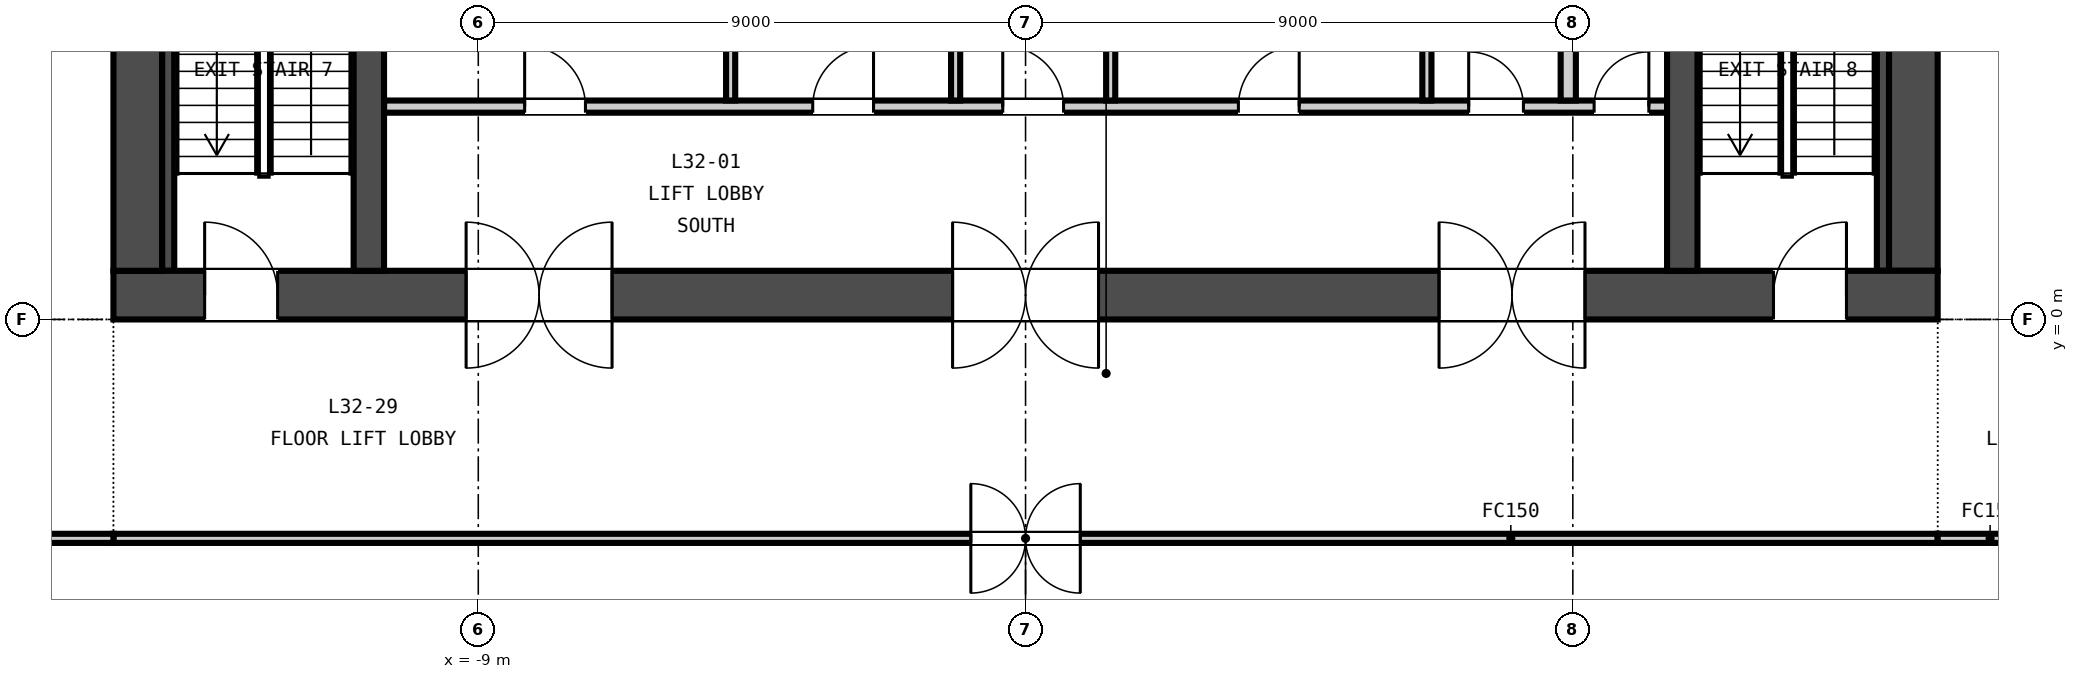
"""IFC4 building model, lengths in metres.
Left out: names, types, materials, properties, quantities, classifications, styles, units other than length and angle.
Written with IfcOpenShell. Run it as: python <this file> out.ifc"""

import sys

from ifc_helpers import new_model, si_unit, direction, frame, frame_2d, origin, place, context, subcontext, project, spatial, rectangle, extrude, element, fill, save


model = new_model("IFC4")
c1 = context("Model", 3, precision=1e-05, world=origin(), true_north=direction((0.0, 1.0)))
c2 = subcontext(c1, "Body", "Model", "MODEL_VIEW")
j1 = project(units=[si_unit("LENGTHUNIT", "METRE"), si_unit("PLANEANGLEUNIT", "RADIAN")], contexts=[c1])
p1 = place(None, origin())
s1 = spatial("IfcSite", under=j1, at=p1, CompositionType="ELEMENT")
p2 = place(p1, origin())
s2 = spatial("IfcBuilding", under=s1, at=p2, CompositionType="ELEMENT")
p3 = place(p2, frame((0.0, 0.0, 133.45)))
s3 = spatial("IfcBuildingStorey", under=s2, at=p3, CompositionType="ELEMENT", Elevation=133.45)
p4 = place(p3, frame((-15.0, 0.4, -0.15), z_axis=(0.0, 0.0, 1.0), x_axis=(1.0, 0.0, 0.0)))
e1 = element("IfcWall", 1, at=p4, inside=s3, PredefinedType="SOLIDWALL", context=c2, shape_type="SweptSolid", body=[
    extrude(rectangle(XDim=30.0, YDim=0.8, at=frame_2d((15.0, 0.0))), origin(), (0.0, 0.0, 1.0), 3.65),
])
p5 = place(p4, frame((5.8, 0.0, 0.15)))
e2 = element("IfcOpeningElement", 2, at=p5, cuts=e1, PredefinedType="OPENING", context=c2, shape_type="SweptSolid", body=[
    extrude(rectangle(XDim=2.4, YDim=2.4, at=frame_2d((1.2, 1.2))), frame((0.0, 0.41, 0.0), z_axis=(0.0, -1.0, 0.0), x_axis=(1.0, 0.0, 0.0)), (0.0, 0.0, 1.0), 0.82),
])
p6 = place(p4, frame((13.8, 0.0, 0.15)))
e3 = element("IfcOpeningElement", 3, at=p6, cuts=e1, PredefinedType="OPENING", context=c2, shape_type="SweptSolid", body=[
    extrude(rectangle(XDim=2.4, YDim=2.4, at=frame_2d((1.2, 1.2))), frame((0.0, 0.41, 0.0), z_axis=(0.0, -1.0, 0.0), x_axis=(1.0, 0.0, 0.0)), (0.0, 0.0, 1.0), 0.82),
])
p7 = place(p4, frame((21.8, 0.0, 0.15)))
e4 = element("IfcOpeningElement", 4, at=p7, cuts=e1, PredefinedType="OPENING", context=c2, shape_type="SweptSolid", body=[
    extrude(rectangle(XDim=2.4, YDim=2.4, at=frame_2d((1.2, 1.2))), frame((0.0, 0.41, 0.0), z_axis=(0.0, -1.0, 0.0), x_axis=(1.0, 0.0, 0.0)), (0.0, 0.0, 1.0), 0.82),
])
p8 = place(p4, frame((1.5, 0.0, 0.15)))
e5 = element("IfcOpeningElement", 5, at=p8, cuts=e1, PredefinedType="OPENING", context=c2, shape_type="SweptSolid", body=[
    extrude(rectangle(XDim=1.2, YDim=2.1, at=frame_2d((0.6, 1.05))), frame((0.0, 0.41, 0.0), z_axis=(0.0, -1.0, 0.0), x_axis=(1.0, 0.0, 0.0)), (0.0, 0.0, 1.0), 0.82),
])
p9 = place(p4, frame((27.3, 0.0, 0.15)))
e6 = element("IfcOpeningElement", 6, at=p9, cuts=e1, PredefinedType="OPENING", context=c2, shape_type="SweptSolid", body=[
    extrude(rectangle(XDim=1.2, YDim=2.1, at=frame_2d((0.6, 1.05))), frame((0.0, 0.41, 0.0), z_axis=(0.0, -1.0, 0.0), x_axis=(1.0, 0.0, 0.0)), (0.0, 0.0, 1.0), 0.82),
])
for number, where, z_axis, x_axis in (
    (7, (-14.6, 0.8, -0.15), (0.0, 0.0, 1.0), (0.0, 1.0, 0.0)),
    (8, (14.6, 0.8, -0.15), (0.0, 0.0, 1.0), (0.0, 1.0, 0.0)),
):
    element("IfcWall", number, at=place(p3, frame(where, z_axis=z_axis, x_axis=x_axis)), inside=s3, PredefinedType="SOLIDWALL", context=c2, shape_type="SweptSolid", body=[
        extrude(rectangle(XDim=13.4, YDim=0.8, at=frame_2d((6.7, 0.0))), origin(), (0.0, 0.0, 1.0), 3.65),
    ])
for number, where, z_axis, x_axis in (
    (9, (-10.8, 0.8, -0.15), (0.0, 0.0, 1.0), (0.0, 1.0, 0.0)),
    (10, (10.8, 0.8, -0.15), (0.0, 0.0, 1.0), (0.0, 1.0, 0.0)),
):
    element("IfcWall", number, at=place(p3, frame(where, z_axis=z_axis, x_axis=x_axis)), inside=s3, PredefinedType="SOLIDWALL", context=c2, shape_type="SweptSolid", body=[
        extrude(rectangle(XDim=13.4, YDim=0.5, at=frame_2d((6.7, 0.0))), origin(), (0.0, 0.0, 1.0), 3.65),
    ])
p10 = place(p3, frame((-10.55, 3.5, 0.0), z_axis=(0.0, 0.0, 1.0), x_axis=(1.0, 0.0, 0.0)))
e11 = element("IfcWall", 11, at=p10, inside=s3, PredefinedType="PARTITIONING", context=c2, shape_type="SweptSolid", body=[
    extrude(rectangle(XDim=21.1, YDim=0.2, at=frame_2d((10.55, 0.0))), origin(), (0.0, 0.0, 1.0), 3.5),
])
p11 = place(p10, frame((2.312, 0.0, 0.0)))
e12 = element("IfcOpeningElement", 12, at=p11, cuts=e11, PredefinedType="OPENING", context=c2, shape_type="SweptSolid", body=[
    extrude(rectangle(XDim=1.0, YDim=2.1, at=frame_2d((0.5, 1.05))), frame((0.0, 0.11, 0.0), z_axis=(0.0, -1.0, 0.0), x_axis=(1.0, 0.0, 0.0)), (0.0, 0.0, 1.0), 0.22),
])
p12 = place(p10, frame((7.05, 0.0, 0.0)))
e13 = element("IfcOpeningElement", 13, at=p12, cuts=e11, PredefinedType="OPENING", context=c2, shape_type="SweptSolid", body=[
    extrude(rectangle(XDim=1.0, YDim=2.1, at=frame_2d((0.5, 1.05))), frame((0.0, 0.11, 0.0), z_axis=(0.0, -1.0, 0.0), x_axis=(1.0, 0.0, 0.0)), (0.0, 0.0, 1.0), 0.22),
])
p13 = place(p10, frame((10.175, 0.0, 0.0)))
e14 = element("IfcOpeningElement", 14, at=p13, cuts=e11, PredefinedType="OPENING", context=c2, shape_type="SweptSolid", body=[
    extrude(rectangle(XDim=1.0, YDim=2.1, at=frame_2d((0.5, 1.05))), frame((0.0, 0.11, 0.0), z_axis=(0.0, -1.0, 0.0), x_axis=(1.0, 0.0, 0.0)), (0.0, 0.0, 1.0), 0.22),
])
p14 = place(p10, frame((14.05, 0.0, 0.0)))
e15 = element("IfcOpeningElement", 15, at=p14, cuts=e11, PredefinedType="OPENING", context=c2, shape_type="SweptSolid", body=[
    extrude(rectangle(XDim=1.0, YDim=2.1, at=frame_2d((0.5, 1.05))), frame((0.0, 0.11, 0.0), z_axis=(0.0, -1.0, 0.0), x_axis=(1.0, 0.0, 0.0)), (0.0, 0.0, 1.0), 0.22),
])
p15 = place(p10, frame((17.837, 0.0, 0.0)))
e16 = element("IfcOpeningElement", 16, at=p15, cuts=e11, PredefinedType="OPENING", context=c2, shape_type="SweptSolid", body=[
    extrude(rectangle(XDim=0.9, YDim=2.1, at=frame_2d((0.45, 1.05))), frame((0.0, 0.11, 0.0), z_axis=(0.0, -1.0, 0.0), x_axis=(1.0, 0.0, 0.0)), (0.0, 0.0, 1.0), 0.22),
])
p16 = place(p10, frame((19.9, 0.0, 0.0)))
e17 = element("IfcOpeningElement", 17, at=p16, cuts=e11, PredefinedType="OPENING", context=c2, shape_type="SweptSolid", body=[
    extrude(rectangle(XDim=0.9, YDim=2.1, at=frame_2d((0.45, 1.05))), frame((0.0, 0.11, 0.0), z_axis=(0.0, -1.0, 0.0), x_axis=(1.0, 0.0, 0.0)), (0.0, 0.0, 1.0), 0.22),
])
for number, where, z_axis, x_axis in (
    (18, (-4.85, 3.6, 0.0), (0.0, 0.0, 1.0), (0.0, 1.0, 0.0)),
    (19, (-1.15, 3.6, 0.0), (0.0, 0.0, 1.0), (0.0, 1.0, 0.0)),
    (20, (1.4, 3.6, 0.0), (0.0, 0.0, 1.0), (0.0, 1.0, 0.0)),
    (21, (6.6, 3.6, 0.0), (0.0, 0.0, 1.0), (0.0, 1.0, 0.0)),
):
    element("IfcWall", number, at=place(p3, frame(where, z_axis=z_axis, x_axis=x_axis)), inside=s3, PredefinedType="PARTITIONING", context=c2, shape_type="SweptSolid", body=[
        extrude(rectangle(XDim=2.3, YDim=0.15, at=frame_2d((1.15, 0.0))), origin(), (0.0, 0.0, 1.0), 3.5),
    ])
p17 = place(p3, frame((8.925, 3.6, 0.0), z_axis=(0.0, 0.0, 1.0), x_axis=(0.0, 1.0, 0.0)))
e22 = element("IfcWall", 22, at=p17, inside=s3, PredefinedType="PARTITIONING", context=c2, shape_type="SweptSolid", body=[
    extrude(rectangle(XDim=2.3, YDim=0.25, at=frame_2d((1.15, 0.0))), origin(), (0.0, 0.0, 1.0), 3.5),
])
for number, where, z_axis, x_axis in (
    (23, (-14.1, 0.8, 0.0), (0.0, 0.0, 1.0), (0.0, 1.0, 0.0)),
    (24, (14.1, 0.8, 0.0), (0.0, 0.0, 1.0), (0.0, 1.0, 0.0)),
):
    element("IfcWall", number, at=place(p3, frame(where, z_axis=z_axis, x_axis=x_axis)), inside=s3, PredefinedType="SOLIDWALL", context=c2, shape_type="SweptSolid", body=[
        extrude(rectangle(XDim=13.4, YDim=0.2, at=frame_2d((6.7, 0.0))), origin(), (0.0, 0.0, 1.0), 3.5),
    ])
p18 = place(p3, frame((15.0, -3.6, 0.0), z_axis=(0.0, 0.0, 1.0), x_axis=(-1.0, 0.0, 0.0)))
e25 = element("IfcWall", 25, at=p18, inside=s3, PredefinedType="PARTITIONING", context=c2, shape_type="SweptSolid", body=[
    extrude(rectangle(XDim=30.0, YDim=0.15, at=frame_2d((15.0, 0.0))), origin(), (0.0, 0.0, 1.0), 2.741),
])
p19 = place(p18, frame((14.1, 0.0, 0.0)))
e26 = element("IfcOpeningElement", 26, at=p19, cuts=e25, PredefinedType="OPENING", context=c2, shape_type="SweptSolid", body=[
    extrude(rectangle(XDim=1.8, YDim=2.1, at=frame_2d((0.9, 1.05))), frame((0.0, 0.085, 0.0), z_axis=(0.0, -1.0, 0.0), x_axis=(1.0, 0.0, 0.0)), (0.0, 0.0, 1.0), 0.17),
])
p20 = place(p3, frame((16.714, -3.6, 0.0), z_axis=(0.0, 0.0, 1.0), x_axis=(-1.0, 0.0, 0.0)))
e27 = element("IfcWall", 27, at=p20, inside=s3, PredefinedType="PARTITIONING", context=c2, shape_type="SweptSolid", body=[
    extrude(rectangle(XDim=1.714, YDim=0.15, at=frame_2d((0.857, 0.0))), origin(), (0.0, 0.0, 1.0), 2.741),
])
p21 = place(p3, frame((-15.0, -3.6, 0.0), z_axis=(0.0, 0.0, 1.0), x_axis=(-1.0, 0.0, 0.0)))
e28 = element("IfcWall", 28, at=p21, inside=s3, PredefinedType="PARTITIONING", context=c2, shape_type="SweptSolid", body=[
    extrude(rectangle(XDim=3.9, YDim=0.15, at=frame_2d((1.95, 0.0))), origin(), (0.0, 0.0, 1.0), 2.741),
])
p22 = place(p11, origin())
e29 = element("IfcDoor", 29, at=p22, inside=s3, OperationType="SINGLE_SWING_LEFT", PredefinedType="DOOR", context=c2, shape_type="SweptSolid", body=[
    extrude(rectangle(XDim=1.0, YDim=2.1, at=frame_2d((0.5, 1.05))), frame((0.0, 0.025, 0.0), z_axis=(0.0, -1.0, 0.0), x_axis=(1.0, 0.0, 0.0)), (0.0, 0.0, 1.0), 0.05),
])
fill(e12, e29)
p23 = place(p12, origin())
e30 = element("IfcDoor", 30, at=p23, inside=s3, OperationType="SINGLE_SWING_RIGHT", PredefinedType="DOOR", context=c2, shape_type="SweptSolid", body=[
    extrude(rectangle(XDim=1.0, YDim=2.1, at=frame_2d((0.5, 1.05))), frame((0.0, 0.025, 0.0), z_axis=(0.0, -1.0, 0.0), x_axis=(1.0, 0.0, 0.0)), (0.0, 0.0, 1.0), 0.05),
])
fill(e13, e30)
p24 = place(p13, origin())
e31 = element("IfcDoor", 31, at=p24, inside=s3, OperationType="SINGLE_SWING_LEFT", PredefinedType="DOOR", context=c2, shape_type="SweptSolid", body=[
    extrude(rectangle(XDim=1.0, YDim=2.1, at=frame_2d((0.5, 1.05))), frame((0.0, 0.025, 0.0), z_axis=(0.0, -1.0, 0.0), x_axis=(1.0, 0.0, 0.0)), (0.0, 0.0, 1.0), 0.05),
])
fill(e14, e31)
p25 = place(p14, origin())
e32 = element("IfcDoor", 32, at=p25, inside=s3, OperationType="SINGLE_SWING_RIGHT", PredefinedType="DOOR", context=c2, shape_type="SweptSolid", body=[
    extrude(rectangle(XDim=1.0, YDim=2.1, at=frame_2d((0.5, 1.05))), frame((0.0, 0.025, 0.0), z_axis=(0.0, -1.0, 0.0), x_axis=(1.0, 0.0, 0.0)), (0.0, 0.0, 1.0), 0.05),
])
fill(e15, e32)
p26 = place(p15, origin())
e33 = element("IfcDoor", 33, at=p26, inside=s3, OperationType="SINGLE_SWING_LEFT", PredefinedType="DOOR", context=c2, shape_type="SweptSolid", body=[
    extrude(rectangle(XDim=0.9, YDim=2.1, at=frame_2d((0.45, 1.05))), frame((0.0, 0.025, 0.0), z_axis=(0.0, -1.0, 0.0), x_axis=(1.0, 0.0, 0.0)), (0.0, 0.0, 1.0), 0.05),
])
fill(e16, e33)
p27 = place(p16, origin())
e34 = element("IfcDoor", 34, at=p27, inside=s3, OperationType="SINGLE_SWING_RIGHT", PredefinedType="DOOR", context=c2, shape_type="SweptSolid", body=[
    extrude(rectangle(XDim=0.9, YDim=2.1, at=frame_2d((0.45, 1.05))), frame((0.0, 0.025, 0.0), z_axis=(0.0, -1.0, 0.0), x_axis=(1.0, 0.0, 0.0)), (0.0, 0.0, 1.0), 0.05),
])
fill(e17, e34)
p28 = place(p5, origin())
e35 = element("IfcDoor", 35, at=p28, inside=s3, OperationType="DOUBLE_DOOR_DOUBLE_SWING", PredefinedType="DOOR", context=c2, shape_type="SweptSolid", body=[
    extrude(rectangle(XDim=2.4, YDim=2.4, at=frame_2d((1.2, 1.2))), frame((0.0, 0.025, 0.0), z_axis=(0.0, -1.0, 0.0), x_axis=(1.0, 0.0, 0.0)), (0.0, 0.0, 1.0), 0.05),
])
fill(e2, e35)
p29 = place(p6, origin())
e36 = element("IfcDoor", 36, at=p29, inside=s3, OperationType="DOUBLE_DOOR_DOUBLE_SWING", PredefinedType="DOOR", context=c2, shape_type="SweptSolid", body=[
    extrude(rectangle(XDim=2.4, YDim=2.4, at=frame_2d((1.2, 1.2))), frame((0.0, 0.025, 0.0), z_axis=(0.0, -1.0, 0.0), x_axis=(1.0, 0.0, 0.0)), (0.0, 0.0, 1.0), 0.05),
])
fill(e3, e36)
p30 = place(p7, origin())
e37 = element("IfcDoor", 37, at=p30, inside=s3, OperationType="DOUBLE_DOOR_DOUBLE_SWING", PredefinedType="DOOR", context=c2, shape_type="SweptSolid", body=[
    extrude(rectangle(XDim=2.4, YDim=2.4, at=frame_2d((1.2, 1.2))), frame((0.0, 0.025, 0.0), z_axis=(0.0, -1.0, 0.0), x_axis=(1.0, 0.0, 0.0)), (0.0, 0.0, 1.0), 0.05),
])
fill(e4, e37)
p31 = place(p8, origin())
e38 = element("IfcDoor", 38, at=p31, inside=s3, OperationType="SINGLE_SWING_LEFT", PredefinedType="DOOR", context=c2, shape_type="SweptSolid", body=[
    extrude(rectangle(XDim=1.2, YDim=2.1, at=frame_2d((0.6, 1.05))), frame((0.0, 0.025, 0.0), z_axis=(0.0, -1.0, 0.0), x_axis=(1.0, 0.0, 0.0)), (0.0, 0.0, 1.0), 0.05),
])
fill(e5, e38)
p32 = place(p9, origin())
e39 = element("IfcDoor", 39, at=p32, inside=s3, OperationType="SINGLE_SWING_RIGHT", PredefinedType="DOOR", context=c2, shape_type="SweptSolid", body=[
    extrude(rectangle(XDim=1.2, YDim=2.1, at=frame_2d((0.6, 1.05))), frame((0.0, 0.025, 0.0), z_axis=(0.0, -1.0, 0.0), x_axis=(1.0, 0.0, 0.0)), (0.0, 0.0, 1.0), 0.05),
])
fill(e6, e39)
p33 = place(p19, origin())
e40 = element("IfcDoor", 40, at=p33, inside=s3, OperationType="DOUBLE_DOOR_DOUBLE_SWING", PredefinedType="DOOR", context=c2, shape_type="SweptSolid", body=[
    extrude(rectangle(XDim=1.8, YDim=2.1, at=frame_2d((0.9, 1.05))), frame((0.0, 0.025, 0.0), z_axis=(0.0, -1.0, 0.0), x_axis=(1.0, 0.0, 0.0)), (0.0, 0.0, 1.0), 0.05),
])
fill(e26, e40)
save(model, sys.argv[1])
